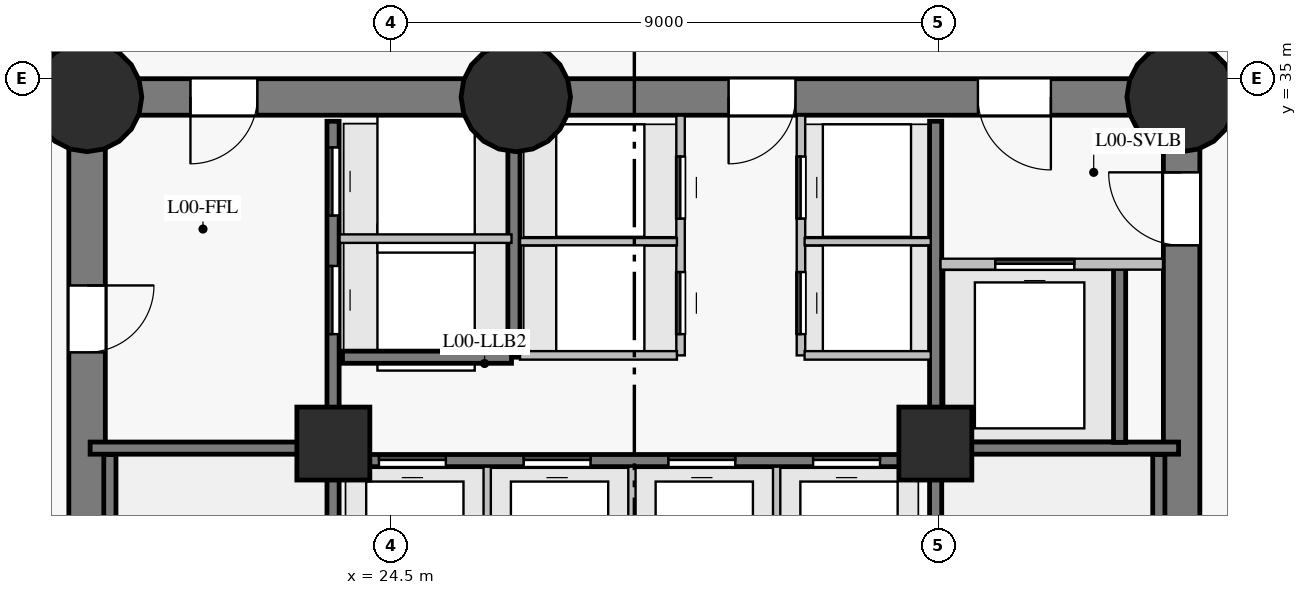
"""IFC4 building model, lengths in metres.
Left out: names, types, materials, properties, quantities, classifications, styles, units other than length and angle.
Written with IfcOpenShell. Run it as: python <this file> out.ifc"""

import sys

from ifc_helpers import new_model, si_unit, direction, frame, frame_2d, origin, origin_with_axes, origin_2d, place, context, subcontext, project, spatial, rectangle, circle, extrude, source, transform, mapped, element, fill, save


model = new_model("IFC4")
c1 = context("Model", 3, precision=1e-05, world=origin(), true_north=direction((0.0, 1.0)))
c2 = subcontext(c1, "Body", "Model", "MODEL_VIEW")
j1 = project(units=[si_unit("LENGTHUNIT", "METRE"), si_unit("PLANEANGLEUNIT", "RADIAN")], contexts=[c1])
p1 = place(None, origin())
s1 = spatial("IfcSite", under=j1, at=p1, CompositionType="ELEMENT")
p2 = place(p1, origin())
s2 = spatial("IfcBuilding", under=s1, at=p2, CompositionType="ELEMENT")
p3 = place(p2, origin())
s3 = spatial("IfcBuildingStorey", under=s2, at=p3, CompositionType="ELEMENT", Elevation=0.0)
p4 = place(p3, frame((37.5, 18.3, 0.0), z_axis=(0.0, 0.0, 1.0), x_axis=(0.0, 1.0, 0.0)))
e1 = element("IfcWall", 1, at=p4, inside=s3, PredefinedType="SHEAR", context=c2, shape_type="SweptSolid", body=[
    extrude(rectangle(XDim=16.4, YDim=0.6, at=frame_2d((8.2, 0.0))), origin(), (0.0, 0.0, 1.0), 4.2),
])
p5 = place(p4, frame((13.96, 0.0, 0.0)))
e2 = element("IfcOpeningElement", 2, at=p5, cuts=e1, PredefinedType="OPENING", context=c2, shape_type="SweptSolid", body=[
    extrude(rectangle(XDim=1.2, YDim=2.15, at=frame_2d((0.6, 1.075))), frame((0.0, 0.31, 0.0), z_axis=(0.0, -1.0, 0.0), x_axis=(1.0, 0.0, 0.0)), (0.0, 0.0, 1.0), 0.62),
])
p6 = place(p3, frame((37.5, 34.7, 0.0), z_axis=(0.0, 0.0, 1.0), x_axis=(-1.0, 0.0, 0.0)))
e3 = element("IfcWall", 3, at=p6, inside=s3, PredefinedType="SHEAR", context=c2, shape_type="SweptSolid", body=[
    extrude(rectangle(XDim=10.95, YDim=0.6, at=frame_2d((5.475, 0.0))), origin(), (0.0, 0.0, 1.0), 4.2),
])
p7 = place(p6, frame((2.15, 0.0, 0.0)))
e4 = element("IfcOpeningElement", 4, at=p7, cuts=e3, PredefinedType="OPENING", context=c2, shape_type="SweptSolid", body=[
    extrude(rectangle(XDim=1.2, YDim=2.15, at=frame_2d((0.6, 1.075))), frame((0.0, 0.31, 0.0), z_axis=(0.0, -1.0, 0.0), x_axis=(1.0, 0.0, 0.0)), (0.0, 0.0, 1.0), 0.62),
])
p8 = place(p6, frame((6.35, 0.0, 0.0)))
e5 = element("IfcOpeningElement", 5, at=p8, cuts=e3, PredefinedType="OPENING", context=c2, shape_type="SweptSolid", body=[
    extrude(rectangle(XDim=1.1, YDim=2.15, at=frame_2d((0.55, 1.075))), frame((0.0, 0.31, 0.0), z_axis=(0.0, -1.0, 0.0), x_axis=(1.0, 0.0, 0.0)), (0.0, 0.0, 1.0), 0.62),
])
p9 = place(p3, frame((26.55, 34.7, 0.0), z_axis=(0.0, 0.0, 1.0), x_axis=(-1.0, 0.0, 0.0)))
e6 = element("IfcWall", 6, at=p9, inside=s3, PredefinedType="SHEAR", context=c2, shape_type="SweptSolid", body=[
    extrude(rectangle(XDim=7.05, YDim=0.6, at=frame_2d((3.525, 0.0))), origin(), (0.0, 0.0, 1.0), 4.2),
])
p10 = place(p9, frame((4.25, 0.0, 0.0)))
e7 = element("IfcOpeningElement", 7, at=p10, cuts=e6, PredefinedType="OPENING", context=c2, shape_type="SweptSolid", body=[
    extrude(rectangle(XDim=1.1, YDim=2.15, at=frame_2d((0.55, 1.075))), frame((0.0, 0.31, 0.0), z_axis=(0.0, -1.0, 0.0), x_axis=(1.0, 0.0, 0.0)), (0.0, 0.0, 1.0), 0.62),
])
p11 = place(p3, frame((19.5, 34.7, 0.0), z_axis=(0.0, 0.0, 1.0), x_axis=(0.0, -1.0, 0.0)))
e8 = element("IfcWall", 8, at=p11, inside=s3, PredefinedType="SHEAR", context=c2, shape_type="SweptSolid", body=[
    extrude(rectangle(XDim=16.4, YDim=0.6, at=frame_2d((8.2, 0.0))), origin(), (0.0, 0.0, 1.0), 4.2),
])
p12 = place(p11, frame((3.1, 0.0, 0.0)))
e9 = element("IfcOpeningElement", 9, at=p12, cuts=e8, PredefinedType="OPENING", context=c2, shape_type="SweptSolid", body=[
    extrude(rectangle(XDim=1.1, YDim=2.15, at=frame_2d((0.55, 1.075))), frame((0.0, 0.31, 0.0), z_axis=(0.0, -1.0, 0.0), x_axis=(1.0, 0.0, 0.0)), (0.0, 0.0, 1.0), 0.62),
])
m1 = source(origin_with_axes(), c2, "Body", "SweptSolid", [
    extrude(circle(Radius=0.9, at=origin_2d()), origin(), (0.0, 0.0, 1.0), 4.5),
])
for number, where, z_axis, x_axis in (
    (10, (19.5, 34.7, 0.0), (0.0, 0.0, 1.0), (1.0, 0.0, 0.0)),
    (11, (26.55, 34.7, 0.0), (0.0, 0.0, 1.0), (1.0, 0.0, 0.0)),
    (12, (37.5, 34.7, 0.0), (0.0, 0.0, 1.0), (1.0, 0.0, 0.0)),
):
    element("IfcColumn", number, at=place(p3, frame(where, z_axis=z_axis, x_axis=x_axis)), inside=s3, PredefinedType="COLUMN", context=c2, shape_type="MappedRepresentation", body=[
        mapped(m1, transform((0.0, 0.0, 0.0), scale=1.0)),
    ])
m2 = source(origin_with_axes(), c2, "Body", "SweptSolid", [
    extrude(rectangle(XDim=1.2, YDim=1.2, at=origin_2d()), origin(), (0.0, 0.0, 1.0), 4.5),
])
for number, where, z_axis, x_axis in (
    (13, (23.55, 29.0, 0.0), (0.0, 0.0, 1.0), (1.0, 0.0, 0.0)),
    (14, (33.45, 29.0, 0.0), (0.0, 0.0, 1.0), (1.0, 0.0, 0.0)),
):
    element("IfcColumn", number, at=place(p3, frame(where, z_axis=z_axis, x_axis=x_axis)), inside=s3, PredefinedType="COLUMN", context=c2, shape_type="MappedRepresentation", body=[
        mapped(m2, transform((0.0, 0.0, 0.0), scale=1.0)),
    ])
p13 = place(p3, frame((23.545, 18.7, 0.0), z_axis=(0.0, 0.0, 1.0), x_axis=(0.0, 1.0, 0.0)))
e15 = element("IfcWall", 15, at=p13, inside=s3, PredefinedType="SHEAR", context=c2, shape_type="SweptSolid", body=[
    extrude(rectangle(XDim=15.6, YDim=0.2, at=frame_2d((7.8, 0.0))), origin(), (0.0, 0.0, 1.0), 4.2),
])
p14 = place(p13, frame((2.75, 0.0, 0.0)))
e16 = element("IfcOpeningElement", 16, at=p14, cuts=e15, PredefinedType="OPENING", context=c2, shape_type="SweptSolid", body=[
    extrude(rectangle(XDim=1.15, YDim=2.15, at=frame_2d((0.575, 1.075))), frame((0.0, 0.11, 0.0), z_axis=(0.0, -1.0, 0.0), x_axis=(1.0, 0.0, 0.0)), (0.0, 0.0, 1.0), 0.22),
])
p15 = place(p13, frame((0.14, 0.0, 0.0)))
e17 = element("IfcOpeningElement", 17, at=p15, cuts=e15, PredefinedType="OPENING", context=c2, shape_type="SweptSolid", body=[
    extrude(rectangle(XDim=0.88, YDim=2.1, at=frame_2d((0.44, 1.05))), frame((0.0, 0.11, 0.0), z_axis=(0.0, -1.0, 0.0), x_axis=(1.0, 0.0, 0.0)), (0.0, 0.0, 1.0), 0.22),
])
p16 = place(p13, frame((1.36, 0.0, 0.0)))
e18 = element("IfcOpeningElement", 18, at=p16, cuts=e15, PredefinedType="OPENING", context=c2, shape_type="SweptSolid", body=[
    extrude(rectangle(XDim=0.88, YDim=2.1, at=frame_2d((0.44, 1.05))), frame((0.0, 0.11, 0.0), z_axis=(0.0, -1.0, 0.0), x_axis=(1.0, 0.0, 0.0)), (0.0, 0.0, 1.0), 0.22),
])
p17 = place(p13, frame((12.1, 0.0, 0.0)))
e19 = element("IfcOpeningElement", 19, at=p17, cuts=e15, PredefinedType="OPENING", context=c2, shape_type="SweptSolid", body=[
    extrude(rectangle(XDim=1.12, YDim=2.15, at=frame_2d((0.56, 1.075))), frame((0.0, 0.11, 0.0), z_axis=(0.0, -1.0, 0.0), x_axis=(1.0, 0.0, 0.0)), (0.0, 0.0, 1.0), 0.22),
])
p18 = place(p13, frame((14.05, 0.0, 0.0)))
e20 = element("IfcOpeningElement", 20, at=p18, cuts=e15, PredefinedType="OPENING", context=c2, shape_type="SweptSolid", body=[
    extrude(rectangle(XDim=1.12, YDim=2.15, at=frame_2d((0.56, 1.075))), frame((0.0, 0.11, 0.0), z_axis=(0.0, -1.0, 0.0), x_axis=(1.0, 0.0, 0.0)), (0.0, 0.0, 1.0), 0.22),
])
p19 = place(p3, frame((33.455, 18.7, 0.0), z_axis=(0.0, 0.0, 1.0), x_axis=(0.0, 1.0, 0.0)))
e21 = element("IfcWall", 21, at=p19, inside=s3, PredefinedType="SHEAR", context=c2, shape_type="SweptSolid", body=[
    extrude(rectangle(XDim=15.6, YDim=0.2, at=frame_2d((7.8, 0.0))), origin(), (0.0, 0.0, 1.0), 4.2),
])
p20 = place(p19, frame((2.75, 0.0, 0.0)))
e22 = element("IfcOpeningElement", 22, at=p20, cuts=e21, PredefinedType="OPENING", context=c2, shape_type="SweptSolid", body=[
    extrude(rectangle(XDim=1.15, YDim=2.15, at=frame_2d((0.575, 1.075))), frame((0.0, 0.11, 0.0), z_axis=(0.0, -1.0, 0.0), x_axis=(1.0, 0.0, 0.0)), (0.0, 0.0, 1.0), 0.22),
])
p21 = place(p19, frame((0.55, 0.0, 0.0)))
e23 = element("IfcOpeningElement", 23, at=p21, cuts=e21, PredefinedType="OPENING", context=c2, shape_type="SweptSolid", body=[
    extrude(rectangle(XDim=0.94, YDim=2.1, at=frame_2d((0.47, 1.05))), frame((0.0, 0.11, 0.0), z_axis=(0.0, -1.0, 0.0), x_axis=(1.0, 0.0, 0.0)), (0.0, 0.0, 1.0), 0.22),
])
p22 = place(p3, frame((23.7, 28.72, 0.0), z_axis=(0.0, 0.0, 1.0), x_axis=(1.0, 0.0, 0.0)))
e24 = element("IfcWall", 24, at=p22, inside=s3, PredefinedType="SHEAR", context=c2, shape_type="SweptSolid", body=[
    extrude(rectangle(XDim=9.6, YDim=0.2, at=frame_2d((4.8, 0.0))), origin(), (0.0, 0.0, 1.0), 4.2),
])
p23 = place(p22, frame((0.6, 0.0, 0.0)))
e25 = element("IfcOpeningElement", 25, at=p23, cuts=e24, PredefinedType="OPENING", context=c2, shape_type="SweptSolid", body=[
    extrude(rectangle(XDim=1.1, YDim=2.15, at=frame_2d((0.55, 1.075))), frame((0.0, 0.11, 0.0), z_axis=(0.0, -1.0, 0.0), x_axis=(1.0, 0.0, 0.0)), (0.0, 0.0, 1.0), 0.22),
])
p24 = place(p22, frame((2.98, 0.0, 0.0)))
e26 = element("IfcOpeningElement", 26, at=p24, cuts=e24, PredefinedType="OPENING", context=c2, shape_type="SweptSolid", body=[
    extrude(rectangle(XDim=1.1, YDim=2.15, at=frame_2d((0.55, 1.075))), frame((0.0, 0.11, 0.0), z_axis=(0.0, -1.0, 0.0), x_axis=(1.0, 0.0, 0.0)), (0.0, 0.0, 1.0), 0.22),
])
p25 = place(p22, frame((5.36, 0.0, 0.0)))
e27 = element("IfcOpeningElement", 27, at=p25, cuts=e24, PredefinedType="OPENING", context=c2, shape_type="SweptSolid", body=[
    extrude(rectangle(XDim=1.1, YDim=2.15, at=frame_2d((0.55, 1.075))), frame((0.0, 0.11, 0.0), z_axis=(0.0, -1.0, 0.0), x_axis=(1.0, 0.0, 0.0)), (0.0, 0.0, 1.0), 0.22),
])
p26 = place(p22, frame((7.74, 0.0, 0.0)))
e28 = element("IfcOpeningElement", 28, at=p26, cuts=e24, PredefinedType="OPENING", context=c2, shape_type="SweptSolid", body=[
    extrude(rectangle(XDim=1.1, YDim=2.15, at=frame_2d((0.55, 1.075))), frame((0.0, 0.11, 0.0), z_axis=(0.0, -1.0, 0.0), x_axis=(1.0, 0.0, 0.0)), (0.0, 0.0, 1.0), 0.22),
])
for number, where, z_axis, x_axis in (
    (29, (19.875, 21.32, 0.0), (0.0, 0.0, 1.0), (0.0, 1.0, 0.0)),
    (30, (37.125, 21.32, 0.0), (0.0, 0.0, 1.0), (0.0, 1.0, 0.0)),
):
    element("IfcWall", number, at=place(p3, frame(where, z_axis=z_axis, x_axis=x_axis)), inside=s3, PredefinedType="SHEAR", context=c2, shape_type="SweptSolid", body=[
        extrude(rectangle(XDim=7.5, YDim=0.2, at=frame_2d((3.75, 0.0))), origin(), (0.0, 0.0, 1.0), 4.2),
    ])
for number, where, z_axis, x_axis in (
    (31, (33.455, 28.925, 0.0), (0.0, 0.0, 1.0), (1.0, 0.0, 0.0)),
    (32, (19.55, 28.925, 0.0), (0.0, 0.0, 1.0), (1.0, 0.0, 0.0)),
):
    element("IfcWall", number, at=place(p3, frame(where, z_axis=z_axis, x_axis=x_axis)), inside=s3, PredefinedType="SHEAR", context=c2, shape_type="SweptSolid", body=[
        extrude(rectangle(XDim=3.995, YDim=0.2, at=frame_2d((1.998, 0.0))), origin(), (0.0, 0.0, 1.0), 4.2),
    ])
p27 = place(p3, frame((26.52, 30.42, 0.0), z_axis=(0.0, 0.0, 1.0), x_axis=(0.0, 1.0, 0.0)))
e33 = element("IfcWall", 33, at=p27, inside=s3, PredefinedType="SHEAR", context=c2, shape_type="SweptSolid", body=[
    extrude(rectangle(XDim=3.86, YDim=0.2, at=frame_2d((1.93, 0.0))), origin(), (0.0, 0.0, 1.0), 4.2),
])
p28 = place(p3, frame((36.48, 29.02, 0.0), z_axis=(0.0, 0.0, 1.0), x_axis=(0.0, 1.0, 0.0)))
e34 = element("IfcWall", 34, at=p28, inside=s3, PredefinedType="SHEAR", context=c2, shape_type="SweptSolid", body=[
    extrude(rectangle(XDim=2.86, YDim=0.2, at=frame_2d((1.43, 0.0))), origin(), (0.0, 0.0, 1.0), 4.2),
])
p29 = place(p3, frame((23.7, 30.42, 0.0), z_axis=(0.0, 0.0, 1.0), x_axis=(1.0, 0.0, 0.0)))
e35 = element("IfcWall", 35, at=p29, inside=s3, PredefinedType="SHEAR", context=c2, shape_type="SweptSolid", body=[
    extrude(rectangle(XDim=2.78, YDim=0.2, at=frame_2d((1.39, 0.0))), origin(), (0.0, 0.0, 1.0), 4.2),
])
p30 = place(p3, frame((29.26, 30.45, 0.0), z_axis=(0.0, 0.0, 1.0), x_axis=(0.0, 1.0, 0.0)))
e36 = element("IfcWall", 36, at=p30, inside=s3, PredefinedType="PARTITIONING", context=c2, shape_type="SweptSolid", body=[
    extrude(rectangle(XDim=3.943, YDim=0.14, at=frame_2d((1.972, 0.0))), origin(), (0.0, 0.0, 1.0), 4.2),
])
p31 = place(p30, frame((0.35, 0.0, 0.0)))
e37 = element("IfcOpeningElement", 37, at=p31, cuts=e36, PredefinedType="OPENING", context=c2, shape_type="SweptSolid", body=[
    extrude(rectangle(XDim=1.02, YDim=2.15, at=frame_2d((0.51, 1.075))), frame((0.0, 0.08, 0.0), z_axis=(0.0, -1.0, 0.0), x_axis=(1.0, 0.0, 0.0)), (0.0, 0.0, 1.0), 0.16),
])
p32 = place(p30, frame((2.25, 0.0, 0.0)))
e38 = element("IfcOpeningElement", 38, at=p32, cuts=e36, PredefinedType="OPENING", context=c2, shape_type="SweptSolid", body=[
    extrude(rectangle(XDim=1.02, YDim=2.15, at=frame_2d((0.51, 1.075))), frame((0.0, 0.08, 0.0), z_axis=(0.0, -1.0, 0.0), x_axis=(1.0, 0.0, 0.0)), (0.0, 0.0, 1.0), 0.16),
])
p33 = place(p3, frame((31.24, 30.45, 0.0), z_axis=(0.0, 0.0, 1.0), x_axis=(0.0, 1.0, 0.0)))
e39 = element("IfcWall", 39, at=p33, inside=s3, PredefinedType="PARTITIONING", context=c2, shape_type="SweptSolid", body=[
    extrude(rectangle(XDim=3.943, YDim=0.14, at=frame_2d((1.972, 0.0))), origin(), (0.0, 0.0, 1.0), 4.2),
])
p34 = place(p33, frame((0.35, 0.0, 0.0)))
e40 = element("IfcOpeningElement", 40, at=p34, cuts=e39, PredefinedType="OPENING", context=c2, shape_type="SweptSolid", body=[
    extrude(rectangle(XDim=1.02, YDim=2.15, at=frame_2d((0.51, 1.075))), frame((0.0, 0.08, 0.0), z_axis=(0.0, -1.0, 0.0), x_axis=(1.0, 0.0, 0.0)), (0.0, 0.0, 1.0), 0.16),
])
p35 = place(p33, frame((2.25, 0.0, 0.0)))
e41 = element("IfcOpeningElement", 41, at=p35, cuts=e39, PredefinedType="OPENING", context=c2, shape_type="SweptSolid", body=[
    extrude(rectangle(XDim=1.02, YDim=2.15, at=frame_2d((0.51, 1.075))), frame((0.0, 0.08, 0.0), z_axis=(0.0, -1.0, 0.0), x_axis=(1.0, 0.0, 0.0)), (0.0, 0.0, 1.0), 0.16),
])
p36 = place(p3, frame((33.535, 31.95, 0.0), z_axis=(0.0, 0.0, 1.0), x_axis=(1.0, 0.0, 0.0)))
e42 = element("IfcWall", 42, at=p36, inside=s3, PredefinedType="PARTITIONING", context=c2, shape_type="SweptSolid", body=[
    extrude(rectangle(XDim=3.658, YDim=0.18, at=frame_2d((1.829, 0.0))), origin(), (0.0, 0.0, 1.0), 4.2),
])
p37 = place(p36, frame((0.9, 0.0, 0.0)))
e43 = element("IfcOpeningElement", 43, at=p37, cuts=e42, PredefinedType="OPENING", context=c2, shape_type="SweptSolid", body=[
    extrude(rectangle(XDim=1.3, YDim=2.2, at=frame_2d((0.65, 1.1))), frame((0.0, 0.1, 0.0), z_axis=(0.0, -1.0, 0.0), x_axis=(1.0, 0.0, 0.0)), (0.0, 0.0, 1.0), 0.2),
])
p38 = place(p3, frame((23.652, 32.37, 0.0), z_axis=(0.0, 0.0, 1.0), x_axis=(1.0, 0.0, 0.0)))
e44 = element("IfcWall", 44, at=p38, inside=s3, PredefinedType="PARTITIONING", context=c2, shape_type="SweptSolid", body=[
    extrude(rectangle(XDim=2.828, YDim=0.14, at=frame_2d((1.414, 0.0))), origin(), (0.0, 0.0, 1.0), 4.2),
])
for number, where, z_axis, x_axis in (
    (45, (26.08, 26.02, 0.0), (0.0, 0.0, 1.0), (0.0, 1.0, 0.0)),
    (46, (28.46, 26.02, 0.0), (0.0, 0.0, 1.0), (0.0, 1.0, 0.0)),
    (47, (30.84, 26.02, 0.0), (0.0, 0.0, 1.0), (0.0, 1.0, 0.0)),
):
    element("IfcWall", number, at=place(p3, frame(where, z_axis=z_axis, x_axis=x_axis)), inside=s3, PredefinedType="PARTITIONING", context=c2, shape_type="SweptSolid", body=[
        extrude(rectangle(XDim=2.6, YDim=0.12, at=frame_2d((1.3, 0.0))), origin(), (0.0, 0.0, 1.0), 4.2),
    ])
p39 = place(p3, frame((26.62, 30.45, 0.0), z_axis=(0.0, 0.0, 1.0), x_axis=(1.0, 0.0, 0.0)))
e48 = element("IfcWall", 48, at=p39, inside=s3, PredefinedType="PARTITIONING", context=c2, shape_type="SweptSolid", body=[
    extrude(rectangle(XDim=2.58, YDim=0.14, at=frame_2d((1.29, 0.0))), origin(), (0.0, 0.0, 1.0), 4.2),
])
p40 = place(p3, frame((26.62, 32.32, 0.0), z_axis=(0.0, 0.0, 1.0), x_axis=(1.0, 0.0, 0.0)))
e49 = element("IfcWall", 49, at=p40, inside=s3, PredefinedType="PARTITIONING", context=c2, shape_type="SweptSolid", body=[
    extrude(rectangle(XDim=2.58, YDim=0.12, at=frame_2d((1.29, 0.0))), origin(), (0.0, 0.0, 1.0), 4.2),
])
p41 = place(p3, frame((31.3, 30.45, 0.0), z_axis=(0.0, 0.0, 1.0), x_axis=(1.0, 0.0, 0.0)))
e50 = element("IfcWall", 50, at=p41, inside=s3, PredefinedType="PARTITIONING", context=c2, shape_type="SweptSolid", body=[
    extrude(rectangle(XDim=2.075, YDim=0.14, at=frame_2d((1.038, 0.0))), origin(), (0.0, 0.0, 1.0), 4.2),
])
p42 = place(p3, frame((31.3, 32.32, 0.0), z_axis=(0.0, 0.0, 1.0), x_axis=(1.0, 0.0, 0.0)))
e51 = element("IfcWall", 51, at=p42, inside=s3, PredefinedType="PARTITIONING", context=c2, shape_type="SweptSolid", body=[
    extrude(rectangle(XDim=2.075, YDim=0.12, at=frame_2d((1.038, 0.0))), origin(), (0.0, 0.0, 1.0), 4.2),
])
m3 = source(origin_with_axes(), c2, "Body", "SweptSolid", [
    extrude(rectangle(XDim=1.1, YDim=2.15, at=frame_2d((0.55, 1.075))), frame((0.0, 0.025, 0.0), z_axis=(0.0, -1.0, 0.0), x_axis=(1.0, 0.0, 0.0)), (0.0, 0.0, 1.0), 0.05),
])
p43 = place(p10, origin())
e52 = element("IfcDoor", 52, at=p43, inside=s3, OperationType="SINGLE_SWING_RIGHT", PredefinedType="DOOR", context=c2, shape_type="MappedRepresentation", body=[
    mapped(m3, transform((0.0, 0.0, 0.0), scale=1.0)),
])
fill(e7, e52)
p44 = place(p12, origin())
e53 = element("IfcDoor", 53, at=p44, inside=s3, OperationType="SINGLE_SWING_LEFT", PredefinedType="DOOR", context=c2, shape_type="MappedRepresentation", body=[
    mapped(m3, transform((0.0, 0.0, 0.0), scale=1.0)),
])
fill(e9, e53)
m4 = source(origin_with_axes(), c2, "Body", "SweptSolid", [
    extrude(rectangle(XDim=1.2, YDim=2.15, at=frame_2d((0.6, 1.075))), frame((0.0, 0.025, 0.0), z_axis=(0.0, -1.0, 0.0), x_axis=(1.0, 0.0, 0.0)), (0.0, 0.0, 1.0), 0.05),
])
p45 = place(p5, origin())
e54 = element("IfcDoor", 54, at=p45, inside=s3, OperationType="SINGLE_SWING_RIGHT", PredefinedType="DOOR", context=c2, shape_type="MappedRepresentation", body=[
    mapped(m4, transform((0.0, 0.0, 0.0), scale=1.0)),
])
fill(e2, e54)
p46 = place(p7, origin())
e55 = element("IfcDoor", 55, at=p46, inside=s3, OperationType="SINGLE_SWING_LEFT", PredefinedType="DOOR", context=c2, shape_type="MappedRepresentation", body=[
    mapped(m4, transform((0.0, 0.0, 0.0), scale=1.0)),
])
fill(e4, e55)
m5 = source(origin_with_axes(), c2, "Body", "SweptSolid", [
    extrude(rectangle(XDim=1.3, YDim=2.2, at=frame_2d((0.65, 1.1))), frame((0.0, 0.025, 0.0), z_axis=(0.0, -1.0, 0.0), x_axis=(1.0, 0.0, 0.0)), (0.0, 0.0, 1.0), 0.05),
])
p47 = place(p37, origin())
e56 = element("IfcDoor", 56, at=p47, inside=s3, OperationType="SLIDING_TO_LEFT", PredefinedType="DOOR", context=c2, shape_type="MappedRepresentation", body=[
    mapped(m5, transform((0.0, 0.0, 0.0), scale=1.0)),
])
fill(e43, e56)
p48 = place(p23, origin())
e57 = element("IfcDoor", 57, at=p48, inside=s3, OperationType="SLIDING_TO_LEFT", PredefinedType="DOOR", context=c2, shape_type="MappedRepresentation", body=[
    mapped(m3, transform((0.0, 0.0, 0.0), scale=1.0)),
])
fill(e25, e57)
p49 = place(p24, origin())
e58 = element("IfcDoor", 58, at=p49, inside=s3, OperationType="SLIDING_TO_RIGHT", PredefinedType="DOOR", context=c2, shape_type="MappedRepresentation", body=[
    mapped(m3, transform((0.0, 0.0, 0.0), scale=1.0)),
])
fill(e26, e58)
p50 = place(p25, origin())
e59 = element("IfcDoor", 59, at=p50, inside=s3, OperationType="SLIDING_TO_LEFT", PredefinedType="DOOR", context=c2, shape_type="MappedRepresentation", body=[
    mapped(m3, transform((0.0, 0.0, 0.0), scale=1.0)),
])
fill(e27, e59)
p51 = place(p26, origin())
e60 = element("IfcDoor", 60, at=p51, inside=s3, OperationType="SLIDING_TO_RIGHT", PredefinedType="DOOR", context=c2, shape_type="MappedRepresentation", body=[
    mapped(m3, transform((0.0, 0.0, 0.0), scale=1.0)),
])
fill(e28, e60)
p52 = place(p8, origin())
e61 = element("IfcDoor", 61, at=p52, inside=s3, OperationType="SINGLE_SWING_RIGHT", PredefinedType="DOOR", context=c2, shape_type="MappedRepresentation", body=[
    mapped(m3, transform((0.0, 0.0, 0.0), scale=1.0)),
])
fill(e5, e61)
m6 = source(origin_with_axes(), c2, "Body", "SweptSolid", [
    extrude(rectangle(XDim=1.12, YDim=2.15, at=frame_2d((0.56, 1.075))), frame((0.0, 0.025, 0.0), z_axis=(0.0, -1.0, 0.0), x_axis=(1.0, 0.0, 0.0)), (0.0, 0.0, 1.0), 0.05),
])
p53 = place(p17, origin())
e62 = element("IfcDoor", 62, at=p53, inside=s3, OperationType="SLIDING_TO_LEFT", PredefinedType="DOOR", context=c2, shape_type="MappedRepresentation", body=[
    mapped(m6, transform((0.0, 0.0, 0.0), scale=1.0)),
])
fill(e19, e62)
p54 = place(p18, origin())
e63 = element("IfcDoor", 63, at=p54, inside=s3, OperationType="SLIDING_TO_RIGHT", PredefinedType="DOOR", context=c2, shape_type="MappedRepresentation", body=[
    mapped(m6, transform((0.0, 0.0, 0.0), scale=1.0)),
])
fill(e20, e63)
m7 = source(origin_with_axes(), c2, "Body", "SweptSolid", [
    extrude(rectangle(XDim=1.02, YDim=2.15, at=frame_2d((0.51, 1.075))), frame((0.0, 0.025, 0.0), z_axis=(0.0, -1.0, 0.0), x_axis=(1.0, 0.0, 0.0)), (0.0, 0.0, 1.0), 0.05),
])
p55 = place(p31, origin())
e64 = element("IfcDoor", 64, at=p55, inside=s3, OperationType="SLIDING_TO_LEFT", PredefinedType="DOOR", context=c2, shape_type="MappedRepresentation", body=[
    mapped(m7, transform((0.0, 0.0, 0.0), scale=1.0)),
])
fill(e37, e64)
p56 = place(p32, origin())
e65 = element("IfcDoor", 65, at=p56, inside=s3, OperationType="SLIDING_TO_LEFT", PredefinedType="DOOR", context=c2, shape_type="MappedRepresentation", body=[
    mapped(m7, transform((0.0, 0.0, 0.0), scale=1.0)),
])
fill(e38, e65)
p57 = place(p34, origin())
e66 = element("IfcDoor", 66, at=p57, inside=s3, OperationType="SLIDING_TO_LEFT", PredefinedType="DOOR", context=c2, shape_type="MappedRepresentation", body=[
    mapped(m7, transform((0.0, 0.0, 0.0), scale=1.0)),
])
fill(e40, e66)
p58 = place(p35, origin())
e67 = element("IfcDoor", 67, at=p58, inside=s3, OperationType="SLIDING_TO_LEFT", PredefinedType="DOOR", context=c2, shape_type="MappedRepresentation", body=[
    mapped(m7, transform((0.0, 0.0, 0.0), scale=1.0)),
])
fill(e41, e67)
save(model, sys.argv[1])
